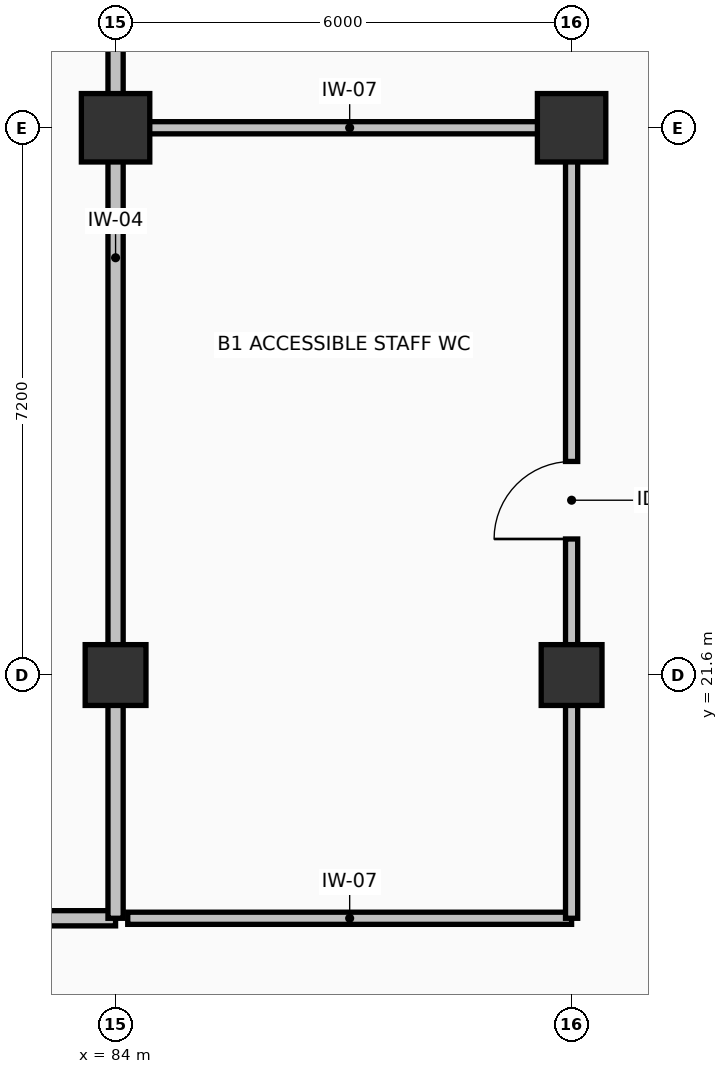
"""IFC4 building model, lengths in metres.
Left out: names, types, materials, properties, quantities, classifications, styles, units other than length and angle.
Written with IfcOpenShell. Run it as: python <this file> out.ifc"""

import sys

from ifc_helpers import new_model, si_unit, direction, frame, frame_2d, origin, origin_2d, place, context, subcontext, project, spatial, rectangle, extrude, element, fill, save


model = new_model("IFC4")
c1 = context("Model", 3, precision=1e-05, world=origin(), true_north=direction((0.0, 1.0)))
c2 = subcontext(c1, "Body", "Model", "MODEL_VIEW")
j1 = project(units=[si_unit("LENGTHUNIT", "METRE"), si_unit("PLANEANGLEUNIT", "RADIAN")], contexts=[c1])
p1 = place(None, origin())
s1 = spatial("IfcSite", under=j1, at=p1, CompositionType="ELEMENT")
p2 = place(p1, origin())
s2 = spatial("IfcBuilding", under=s1, at=p2, CompositionType="ELEMENT")
p3 = place(p2, frame((0.0, 0.0, -4.08)))
s3 = spatial("IfcBuildingStorey", under=s2, at=p3, CompositionType="ELEMENT", Elevation=-4.08)
p4 = place(p3, frame((84.0, 21.6, -0.42), z_axis=(0.0, 0.0, 1.0), x_axis=(1.0, 0.0, 0.0)))
e1 = element("IfcColumn", 1, at=p4, inside=s3, PredefinedType="COLUMN", context=c2, shape_type="SweptSolid", body=[
    extrude(rectangle(XDim=0.8, YDim=0.8, at=origin_2d()), origin(), (0.0, 0.0, 1.0), 4.5),
])
p5 = place(p3, frame((84.0, 28.8, -0.42), z_axis=(0.0, 0.0, 1.0), x_axis=(1.0, 0.0, 0.0)))
e2 = element("IfcColumn", 2, at=p5, inside=s3, PredefinedType="COLUMN", context=c2, shape_type="SweptSolid", body=[
    extrude(rectangle(XDim=0.9, YDim=0.9, at=origin_2d()), origin(), (0.0, 0.0, 1.0), 4.5),
])
p6 = place(p3, frame((90.0, 21.6, -0.42), z_axis=(0.0, 0.0, 1.0), x_axis=(1.0, 0.0, 0.0)))
e3 = element("IfcColumn", 3, at=p6, inside=s3, PredefinedType="COLUMN", context=c2, shape_type="SweptSolid", body=[
    extrude(rectangle(XDim=0.8, YDim=0.8, at=origin_2d()), origin(), (0.0, 0.0, 1.0), 4.5),
])
p7 = place(p3, frame((90.0, 28.8, -0.42), z_axis=(0.0, 0.0, 1.0), x_axis=(1.0, 0.0, 0.0)))
e4 = element("IfcColumn", 4, at=p7, inside=s3, PredefinedType="COLUMN", context=c2, shape_type="SweptSolid", body=[
    extrude(rectangle(XDim=0.9, YDim=0.9, at=origin_2d()), origin(), (0.0, 0.0, 1.0), 4.5),
])
p8 = place(p3, frame((72.0, 18.4, 0.0), z_axis=(0.0, 0.0, 1.0), x_axis=(1.0, 0.0, 0.0)))
e5 = element("IfcWall", 5, at=p8, inside=s3, PredefinedType="PARTITIONING", context=c2, shape_type="SweptSolid", body=[
    extrude(rectangle(XDim=12.0, YDim=0.2, at=frame_2d((6.0, 0.0))), origin(), (0.0, 0.0, 1.0), 3.78),
])
p9 = place(p8, frame((5.51, 0.0, 0.0)))
e6 = element("IfcOpeningElement", 6, at=p9, cuts=e5, PredefinedType="OPENING", context=c2, shape_type="SweptSolid", body=[
    extrude(rectangle(XDim=0.98, YDim=2.12, at=frame_2d((0.49, 1.06))), frame((0.0, 0.11, 0.0), z_axis=(0.0, -1.0, 0.0), x_axis=(1.0, 0.0, 0.0)), (0.0, 0.0, 1.0), 0.22),
])
p10 = place(p3, frame((84.0, 18.4, 0.0), z_axis=(0.0, 0.0, 1.0), x_axis=(0.0, 1.0, 0.0)))
e7 = element("IfcWall", 7, at=p10, inside=s3, PredefinedType="PARTITIONING", context=c2, shape_type="SweptSolid", body=[
    extrude(rectangle(XDim=17.38, YDim=0.2, at=frame_2d((8.69, 0.0))), origin(), (0.0, 0.0, 1.0), 2.82),
])
p11 = place(p3, frame((84.16, 18.4, 0.0), z_axis=(0.0, 0.0, 1.0), x_axis=(1.0, 0.0, 0.0)))
e8 = element("IfcWall", 8, at=p11, inside=s3, PredefinedType="PARTITIONING", context=c2, shape_type="SweptSolid", body=[
    extrude(rectangle(XDim=5.84, YDim=0.16, at=frame_2d((2.92, 0.0))), origin(), (0.0, 0.0, 1.0), 3.78),
])
p12 = place(p3, frame((90.0, 18.4, 0.0), z_axis=(0.0, 0.0, 1.0), x_axis=(0.0, 1.0, 0.0)))
e9 = element("IfcWall", 9, at=p12, inside=s3, PredefinedType="PARTITIONING", context=c2, shape_type="SweptSolid", body=[
    extrude(rectangle(XDim=10.4, YDim=0.16, at=frame_2d((5.2, 0.0))), origin(), (0.0, 0.0, 1.0), 2.82),
])
p13 = place(p12, frame((4.99, 0.0, 0.0)))
e10 = element("IfcOpeningElement", 10, at=p13, cuts=e9, PredefinedType="OPENING", context=c2, shape_type="SweptSolid", body=[
    extrude(rectangle(XDim=1.02, YDim=2.1, at=frame_2d((0.51, 1.05))), frame((0.0, 0.09, 0.0), z_axis=(0.0, -1.0, 0.0), x_axis=(1.0, 0.0, 0.0)), (0.0, 0.0, 1.0), 0.18),
])
p14 = place(p3, frame((90.0, 28.8, 0.0), z_axis=(0.0, 0.0, 1.0), x_axis=(-1.0, 0.0, 0.0)))
e11 = element("IfcWall", 11, at=p14, inside=s3, PredefinedType="PARTITIONING", context=c2, shape_type="SweptSolid", body=[
    extrude(rectangle(XDim=5.84, YDim=0.16, at=frame_2d((2.92, 0.0))), origin(), (0.0, 0.0, 1.0), 3.17),
])
p15 = place(p13, origin())
e12 = element("IfcDoor", 12, at=p15, inside=s3, OperationType="SINGLE_SWING_LEFT", PredefinedType="DOOR", context=c2, shape_type="SweptSolid", body=[
    extrude(rectangle(XDim=1.02, YDim=2.1, at=frame_2d((0.51, 1.05))), frame((0.0, 0.025, 0.0), z_axis=(0.0, -1.0, 0.0), x_axis=(1.0, 0.0, 0.0)), (0.0, 0.0, 1.0), 0.05),
])
fill(e10, e12)
save(model, sys.argv[1])
